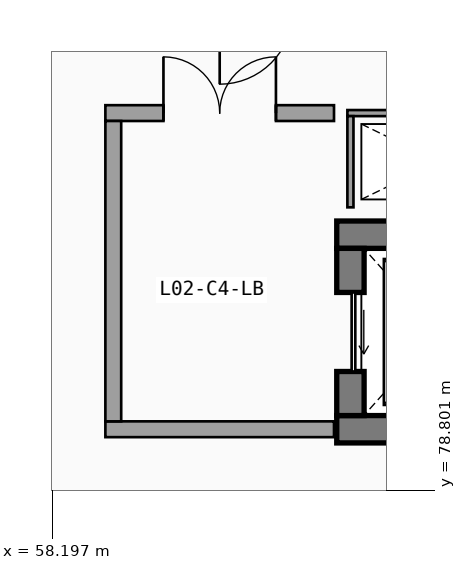
"""IFC4 building model, lengths in metres.
Left out: names, types, materials, properties, quantities, classifications, styles, units other than length and angle.
Written with IfcOpenShell. Run it as: python <this file> out.ifc"""

import sys

from ifc_helpers import new_model, si_unit, direction, frame, frame_2d, origin, place, context, subcontext, project, spatial, rectangle, extrude, element, fill, save


model = new_model("IFC4")
c1 = context("Model", 3, precision=1e-05, world=origin(), true_north=direction((0.0, 1.0)))
c2 = subcontext(c1, "Body", "Model", "MODEL_VIEW")
j1 = project(units=[si_unit("LENGTHUNIT", "METRE"), si_unit("PLANEANGLEUNIT", "RADIAN")], contexts=[c1])
p1 = place(None, origin())
s1 = spatial("IfcSite", under=j1, at=p1, CompositionType="ELEMENT")
p2 = place(p1, origin())
s2 = spatial("IfcBuilding", under=s1, at=p2, CompositionType="ELEMENT")
p3 = place(p2, frame((0.0, 0.0, 9.6)))
s3 = spatial("IfcBuildingStorey", under=s2, at=p3, CompositionType="ELEMENT", Elevation=9.6)
for number, where, z_axis, x_axis in (
    (1, (62.875, 79.8, 0.0), (0.0, 0.0, 1.0), (1.0, 0.0, 0.0)),
    (2, (66.225, 83.0, 0.0), (0.0, 0.0, 1.0), (-1.0, 0.0, 0.0)),
):
    element("IfcWall", number, at=place(p3, frame(where, z_axis=z_axis, x_axis=x_axis)), inside=s3, PredefinedType="SHEAR", context=c2, shape_type="SweptSolid", body=[
        extrude(rectangle(XDim=3.35, YDim=0.45, at=frame_2d((1.675, 0.0))), origin(), (0.0, 0.0, 1.0), 4.22),
    ])
p4 = place(p3, frame((63.1, 82.775, 0.0), z_axis=(0.0, 0.0, 1.0), x_axis=(0.0, -1.0, 0.0)))
e3 = element("IfcWall", 3, at=p4, inside=s3, PredefinedType="SHEAR", context=c2, shape_type="SweptSolid", body=[
    extrude(rectangle(XDim=2.75, YDim=0.45, at=frame_2d((1.375, 0.0))), origin(), (0.0, 0.0, 1.0), 4.22),
])
p5 = place(p4, frame((0.725, 0.0, 0.0), z_axis=(0.0, 0.0, 1.0), x_axis=(1.0, 0.0, 0.0)))
e4 = element("IfcOpeningElement", 4, at=p5, cuts=e3, PredefinedType="OPENING", context=c2, shape_type="SweptSolid", body=[
    extrude(rectangle(XDim=1.3, YDim=2.25, at=frame_2d((0.65, 1.125))), frame((0.0, 0.235, 0.0), z_axis=(0.0, -1.0, 0.0), x_axis=(1.0, 0.0, 0.0)), (0.0, 0.0, 1.0), 0.47),
])
p6 = place(p3, frame((66.05, 85.0, 0.0), z_axis=(0.0, 0.0, 1.0), x_axis=(-1.0, 0.0, 0.0)))
e5 = element("IfcWall", 5, at=p6, inside=s3, PredefinedType="PARTITIONING", context=c2, shape_type="SweptSolid", body=[
    extrude(rectangle(XDim=3.0, YDim=0.1, at=frame_2d((1.5, 0.0))), origin(), (0.0, 0.0, 1.0), 4.22),
])
p7 = place(p3, frame((63.1, 84.95, 0.0), z_axis=(0.0, 0.0, 1.0), x_axis=(0.0, -1.0, 0.0)))
e6 = element("IfcWall", 6, at=p7, inside=s3, PredefinedType="PARTITIONING", context=c2, shape_type="SweptSolid", body=[
    extrude(rectangle(XDim=1.5, YDim=0.1, at=frame_2d((0.75, 0.0))), origin(), (0.0, 0.0, 1.0), 4.22),
])
p8 = place(p3, frame((59.07, 79.8, 0.0), z_axis=(0.0, 0.0, 1.0), x_axis=(1.0, 0.0, 0.0)))
e7 = element("IfcWall", 7, at=p8, inside=s3, PredefinedType="SOLIDWALL", context=c2, shape_type="SweptSolid", body=[
    extrude(rectangle(XDim=3.76, YDim=0.26, at=frame_2d((1.88, 0.0))), origin(), (0.0, 0.0, 1.0), 4.22),
])
p9 = place(p3, frame((62.83, 85.0, 0.0), z_axis=(0.0, 0.0, 1.0), x_axis=(-1.0, 0.0, 0.0)))
e8 = element("IfcWall", 8, at=p9, inside=s3, PredefinedType="SOLIDWALL", context=c2, shape_type="SweptSolid", body=[
    extrude(rectangle(XDim=3.76, YDim=0.26, at=frame_2d((1.88, 0.0))), origin(), (0.0, 0.0, 1.0), 4.22),
])
p10 = place(p9, frame((2.805, 0.0, 0.0), z_axis=(0.0, 0.0, 1.0), x_axis=(-1.0, 0.0, 0.0)))
e9 = element("IfcOpeningElement", 9, at=p10, cuts=e8, PredefinedType="OPENING", context=c2, shape_type="SweptSolid", body=[
    extrude(rectangle(XDim=1.85, YDim=2.25, at=frame_2d((0.925, 1.125))), frame((0.0, 0.14, 0.0), z_axis=(0.0, -1.0, 0.0), x_axis=(1.0, 0.0, 0.0)), (0.0, 0.0, 1.0), 0.28),
])
p11 = place(p3, frame((59.2, 84.87, 0.0), z_axis=(0.0, 0.0, 1.0), x_axis=(0.0, -1.0, 0.0)))
e10 = element("IfcWall", 10, at=p11, inside=s3, PredefinedType="SOLIDWALL", context=c2, shape_type="SweptSolid", body=[
    extrude(rectangle(XDim=4.94, YDim=0.26, at=frame_2d((2.47, 0.0))), origin(), (0.0, 0.0, 1.0), 4.22),
])
p12 = place(p5, origin())
e11 = element("IfcDoor", 11, at=p12, inside=s3, OperationType="SLIDING_TO_RIGHT", PredefinedType="DOOR", context=c2, shape_type="SweptSolid", body=[
    extrude(rectangle(XDim=1.3, YDim=2.25, at=frame_2d((0.65, 1.125))), frame((0.0, 0.025, 0.0), z_axis=(0.0, -1.0, 0.0), x_axis=(1.0, 0.0, 0.0)), (0.0, 0.0, 1.0), 0.05),
])
fill(e4, e11)
p13 = place(p10, origin())
e12 = element("IfcDoor", 12, at=p13, inside=s3, OperationType="DOUBLE_DOOR_SINGLE_SWING", PredefinedType="DOOR", context=c2, shape_type="SweptSolid", body=[
    extrude(rectangle(XDim=1.85, YDim=2.25, at=frame_2d((0.925, 1.125))), frame((0.0, 0.025, 0.0), z_axis=(0.0, -1.0, 0.0), x_axis=(1.0, 0.0, 0.0)), (0.0, 0.0, 1.0), 0.05),
])
fill(e9, e12)
save(model, sys.argv[1])
